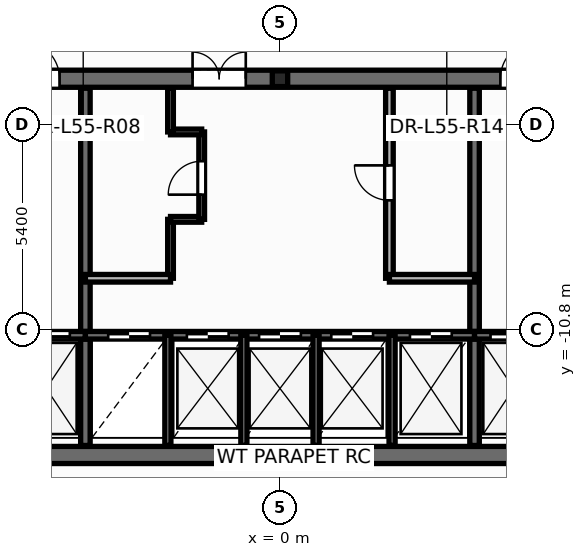
"""IFC4 building model, lengths in metres.
Left out: names, types, materials, properties, quantities, classifications, styles, units other than length and angle.
Written with IfcOpenShell. Run it as: python <this file> out.ifc"""

import sys

from ifc_helpers import new_model, si_unit, direction, frame, frame_2d, origin, origin_2d, place, context, subcontext, project, spatial, rectangle, i_section, extrude, element, fill, save


model = new_model("IFC4")
c1 = context("Model", 3, precision=1e-05, world=origin(), true_north=direction((0.0, 1.0)))
c2 = subcontext(c1, "Body", "Model", "MODEL_VIEW")
j1 = project(units=[si_unit("LENGTHUNIT", "METRE"), si_unit("PLANEANGLEUNIT", "RADIAN")], contexts=[c1])
p1 = place(None, origin())
s1 = spatial("IfcSite", under=j1, at=p1, CompositionType="ELEMENT")
p2 = place(p1, origin())
s2 = spatial("IfcBuilding", under=s1, at=p2, CompositionType="ELEMENT")
p3 = place(p2, frame((0.0, 0.0, 210.9)))
s3 = spatial("IfcBuildingStorey", under=s2, at=p3, CompositionType="ELEMENT", Elevation=210.9)
p4 = place(p3, frame((0.0, -4.2, 0.0), z_axis=(0.0, 0.0, 1.0), x_axis=(1.0, 0.0, 0.0)))
e1 = element("IfcColumn", 1, at=p4, inside=s3, PredefinedType="PILASTER", context=c2, shape_type="SweptSolid", body=[
    extrude(i_section(OverallWidth=0.405, OverallDepth=0.414, WebThickness=0.022, FlangeThickness=0.032, at=origin_2d()), origin(), (0.0, 0.0, 1.0), 3.6),
])
p5 = place(p3, frame((-2.88, -9.45, 0.0), z_axis=(0.0, 0.0, 1.0), x_axis=(0.0, 1.0, 0.0)))
e2 = element("IfcWall", 2, at=p5, inside=s3, PredefinedType="PARTITIONING", context=c2, shape_type="SweptSolid", body=[
    extrude(rectangle(XDim=1.55, YDim=0.15, at=frame_2d((0.775, 0.0))), origin(), (0.0, 0.0, 1.0), 3.345),
])
p6 = place(p3, frame((-2.88, -7.9, 0.0), z_axis=(0.0, 0.0, 1.0), x_axis=(1.0, 0.0, 0.0)))
e3 = element("IfcWall", 3, at=p6, inside=s3, PredefinedType="PARTITIONING", context=c2, shape_type="SweptSolid", body=[
    extrude(rectangle(XDim=0.82, YDim=0.15, at=frame_2d((0.41, 0.0))), origin(), (0.0, 0.0, 1.0), 3.345),
])
p7 = place(p3, frame((-2.06, -7.9, 0.0), z_axis=(0.0, 0.0, 1.0), x_axis=(0.0, 1.0, 0.0)))
e4 = element("IfcWall", 4, at=p7, inside=s3, PredefinedType="PARTITIONING", context=c2, shape_type="SweptSolid", body=[
    extrude(rectangle(XDim=2.3, YDim=0.15, at=frame_2d((1.15, 0.0))), origin(), (0.0, 0.0, 1.0), 3.345),
])
p8 = place(p7, frame((0.65, 0.0, 0.0)))
e5 = element("IfcOpeningElement", 5, at=p8, cuts=e4, PredefinedType="OPENING", context=c2, shape_type="SweptSolid", body=[
    extrude(rectangle(XDim=0.886, YDim=2.104, at=frame_2d((0.44, 1.052))), frame((0.0, 0.085, 0.0), z_axis=(0.0, -1.0, 0.0), x_axis=(1.0, 0.0, 0.0)), (0.0, 0.0, 1.0), 0.17),
])
p9 = place(p3, frame((-2.88, -5.6, 0.0), z_axis=(0.0, 0.0, 1.0), x_axis=(1.0, 0.0, 0.0)))
e6 = element("IfcWall", 6, at=p9, inside=s3, PredefinedType="PARTITIONING", context=c2, shape_type="SweptSolid", body=[
    extrude(rectangle(XDim=0.82, YDim=0.15, at=frame_2d((0.41, 0.0))), origin(), (0.0, 0.0, 1.0), 3.345),
])
p10 = place(p3, frame((-2.88, -5.6, 0.0), z_axis=(0.0, 0.0, 1.0), x_axis=(0.0, 1.0, 0.0)))
e7 = element("IfcWall", 7, at=p10, inside=s3, PredefinedType="PARTITIONING", context=c2, shape_type="SweptSolid", body=[
    extrude(rectangle(XDim=1.15, YDim=0.15, at=frame_2d((0.575, 0.0))), origin(), (0.0, 0.0, 1.0), 3.345),
])
p11 = place(p3, frame((-12.65, -14.1, 0.0), z_axis=(0.0, 0.0, 1.0), x_axis=(1.0, 0.0, 0.0)))
e8 = element("IfcWall", 8, at=p11, inside=s3, PredefinedType="SHEAR", context=c2, shape_type="SweptSolid", body=[
    extrude(rectangle(XDim=25.3, YDim=0.45, at=frame_2d((12.65, 0.0))), origin(), (0.0, 0.0, 1.0), 3.6),
])
p12 = place(p3, frame((-12.65, -4.2, 0.0), z_axis=(0.0, 0.0, 1.0), x_axis=(1.0, 0.0, 0.0)))
e9 = element("IfcWall", 9, at=p12, inside=s3, PredefinedType="SHEAR", context=c2, shape_type="SweptSolid", body=[
    extrude(rectangle(XDim=25.3, YDim=0.45, at=frame_2d((12.65, 0.0))), origin(), (0.0, 0.0, 1.0), 3.6),
])
p13 = place(p12, frame((1.85, 0.0, 0.0)))
e10 = element("IfcOpeningElement", 10, at=p13, cuts=e9, PredefinedType="OPENING", context=c2, shape_type="SweptSolid", body=[
    extrude(rectangle(XDim=0.756, YDim=2.054, at=frame_2d((0.375, 1.027))), frame((0.0, 0.235, 0.0), z_axis=(0.0, -1.0, 0.0), x_axis=(1.0, 0.0, 0.0)), (0.0, 0.0, 1.0), 0.47),
])
p14 = place(p12, frame((21.85, 0.0, 0.0)))
e11 = element("IfcOpeningElement", 11, at=p14, cuts=e9, PredefinedType="OPENING", context=c2, shape_type="SweptSolid", body=[
    extrude(rectangle(XDim=0.756, YDim=2.054, at=frame_2d((0.375, 1.027))), frame((0.0, 0.235, 0.0), z_axis=(0.0, -1.0, 0.0), x_axis=(1.0, 0.0, 0.0)), (0.0, 0.0, 1.0), 0.47),
])
p15 = place(p12, frame((23.5, 0.0, 0.0)))
e12 = element("IfcOpeningElement", 12, at=p15, cuts=e9, PredefinedType="OPENING", context=c2, shape_type="SweptSolid", body=[
    extrude(rectangle(XDim=0.756, YDim=2.054, at=frame_2d((0.375, 1.027))), frame((0.0, 0.235, 0.0), z_axis=(0.0, -1.0, 0.0), x_axis=(1.0, 0.0, 0.0)), (0.0, 0.0, 1.0), 0.47),
])
p16 = place(p12, frame((5.85, 0.0, 0.0)))
e13 = element("IfcOpeningElement", 13, at=p16, cuts=e9, PredefinedType="OPENING", context=c2, shape_type="SweptSolid", body=[
    extrude(rectangle(XDim=1.006, YDim=2.104, at=frame_2d((0.5, 1.052))), frame((0.0, 0.235, 0.0), z_axis=(0.0, -1.0, 0.0), x_axis=(1.0, 0.0, 0.0)), (0.0, 0.0, 1.0), 0.47),
])
p17 = place(p12, frame((10.35, 0.0, 0.0)))
e14 = element("IfcOpeningElement", 14, at=p17, cuts=e9, PredefinedType="OPENING", context=c2, shape_type="SweptSolid", body=[
    extrude(rectangle(XDim=1.406, YDim=2.154, at=frame_2d((0.7, 1.077))), frame((0.0, 0.235, 0.0), z_axis=(0.0, -1.0, 0.0), x_axis=(1.0, 0.0, 0.0)), (0.0, 0.0, 1.0), 0.47),
])
p18 = place(p12, frame((18.45, 0.0, 0.0)))
e15 = element("IfcOpeningElement", 15, at=p18, cuts=e9, PredefinedType="OPENING", context=c2, shape_type="SweptSolid", body=[
    extrude(rectangle(XDim=1.006, YDim=2.104, at=frame_2d((0.5, 1.052))), frame((0.0, 0.235, 0.0), z_axis=(0.0, -1.0, 0.0), x_axis=(1.0, 0.0, 0.0)), (0.0, 0.0, 1.0), 0.47),
])
for number, where, z_axis, x_axis in (
    (16, (-5.12, -13.85, 0.0), (0.0, 0.0, 1.0), (0.0, 1.0, 0.0)),
    (17, (5.12, -13.85, 0.0), (0.0, 0.0, 1.0), (0.0, 1.0, 0.0)),
):
    element("IfcWall", number, at=place(p3, frame(where, z_axis=z_axis, x_axis=x_axis)), inside=s3, PredefinedType="SHEAR", context=c2, shape_type="SweptSolid", body=[
        extrude(rectangle(XDim=9.4, YDim=0.25, at=frame_2d((4.7, 0.0))), origin(), (0.0, 0.0, 1.0), 3.6),
    ])
p19 = place(p3, frame((-8.48, -10.95, 0.0), z_axis=(0.0, 0.0, 1.0), x_axis=(1.0, 0.0, 0.0)))
e18 = element("IfcWall", 18, at=p19, inside=s3, PredefinedType="SOLIDWALL", context=c2, shape_type="SweptSolid", body=[
    extrude(rectangle(XDim=3.36, YDim=0.2, at=frame_2d((1.68, 0.0))), origin(), (0.0, 0.0, 1.0), 3.6),
])
p20 = place(p19, frame((0.28, 0.0, 0.0)))
e19 = element("IfcOpeningElement", 19, at=p20, cuts=e18, PredefinedType="OPENING", context=c2, shape_type="SweptSolid", body=[
    extrude(rectangle(XDim=0.756, YDim=2.054, at=frame_2d((0.375, 1.027))), frame((0.0, 0.11, 0.0), z_axis=(0.0, -1.0, 0.0), x_axis=(1.0, 0.0, 0.0)), (0.0, 0.0, 1.0), 0.22),
])
p21 = place(p19, frame((1.85, 0.0, 0.0)))
e20 = element("IfcOpeningElement", 20, at=p21, cuts=e18, PredefinedType="OPENING", context=c2, shape_type="SweptSolid", body=[
    extrude(rectangle(XDim=1.106, YDim=2.104, at=frame_2d((0.55, 1.052))), frame((0.0, 0.11, 0.0), z_axis=(0.0, -1.0, 0.0), x_axis=(1.0, 0.0, 0.0)), (0.0, 0.0, 1.0), 0.22),
])
p22 = place(p3, frame((-5.12, -10.95, 0.0), z_axis=(0.0, 0.0, 1.0), x_axis=(1.0, 0.0, 0.0)))
e21 = element("IfcWall", 21, at=p22, inside=s3, PredefinedType="SOLIDWALL", context=c2, shape_type="SweptSolid", body=[
    extrude(rectangle(XDim=10.24, YDim=0.2, at=frame_2d((5.12, 0.0))), origin(), (0.0, 0.0, 1.0), 3.6),
])
p23 = place(p22, frame((0.6, 0.0, 0.0)))
e22 = element("IfcOpeningElement", 22, at=p23, cuts=e21, PredefinedType="OPENING", context=c2, shape_type="SweptSolid", body=[
    extrude(rectangle(XDim=1.106, YDim=2.104, at=frame_2d((0.55, 1.052))), frame((0.0, 0.11, 0.0), z_axis=(0.0, -1.0, 0.0), x_axis=(1.0, 0.0, 0.0)), (0.0, 0.0, 1.0), 0.22),
])
p24 = place(p22, frame((2.67, 0.0, 0.0)))
e23 = element("IfcOpeningElement", 23, at=p24, cuts=e21, PredefinedType="OPENING", context=c2, shape_type="SweptSolid", body=[
    extrude(rectangle(XDim=1.106, YDim=2.104, at=frame_2d((0.55, 1.052))), frame((0.0, 0.11, 0.0), z_axis=(0.0, -1.0, 0.0), x_axis=(1.0, 0.0, 0.0)), (0.0, 0.0, 1.0), 0.22),
])
p25 = place(p22, frame((4.57, 0.0, 0.0)))
e24 = element("IfcOpeningElement", 24, at=p25, cuts=e21, PredefinedType="OPENING", context=c2, shape_type="SweptSolid", body=[
    extrude(rectangle(XDim=1.106, YDim=2.104, at=frame_2d((0.55, 1.052))), frame((0.0, 0.11, 0.0), z_axis=(0.0, -1.0, 0.0), x_axis=(1.0, 0.0, 0.0)), (0.0, 0.0, 1.0), 0.22),
])
p26 = place(p22, frame((6.47, 0.0, 0.0)))
e25 = element("IfcOpeningElement", 25, at=p26, cuts=e21, PredefinedType="OPENING", context=c2, shape_type="SweptSolid", body=[
    extrude(rectangle(XDim=1.106, YDim=2.104, at=frame_2d((0.55, 1.052))), frame((0.0, 0.11, 0.0), z_axis=(0.0, -1.0, 0.0), x_axis=(1.0, 0.0, 0.0)), (0.0, 0.0, 1.0), 0.22),
])
p27 = place(p22, frame((8.54, 0.0, 0.0)))
e26 = element("IfcOpeningElement", 26, at=p27, cuts=e21, PredefinedType="OPENING", context=c2, shape_type="SweptSolid", body=[
    extrude(rectangle(XDim=1.106, YDim=2.104, at=frame_2d((0.55, 1.052))), frame((0.0, 0.11, 0.0), z_axis=(0.0, -1.0, 0.0), x_axis=(1.0, 0.0, 0.0)), (0.0, 0.0, 1.0), 0.22),
])
p28 = place(p3, frame((5.12, -10.95, 0.0), z_axis=(0.0, 0.0, 1.0), x_axis=(1.0, 0.0, 0.0)))
e27 = element("IfcWall", 27, at=p28, inside=s3, PredefinedType="SOLIDWALL", context=c2, shape_type="SweptSolid", body=[
    extrude(rectangle(XDim=3.36, YDim=0.2, at=frame_2d((1.68, 0.0))), origin(), (0.0, 0.0, 1.0), 3.6),
])
p29 = place(p28, frame((0.42, 0.0, 0.0)))
e28 = element("IfcOpeningElement", 28, at=p29, cuts=e27, PredefinedType="OPENING", context=c2, shape_type="SweptSolid", body=[
    extrude(rectangle(XDim=1.106, YDim=2.104, at=frame_2d((0.55, 1.052))), frame((0.0, 0.11, 0.0), z_axis=(0.0, -1.0, 0.0), x_axis=(1.0, 0.0, 0.0)), (0.0, 0.0, 1.0), 0.22),
])
p30 = place(p28, frame((2.3, 0.0, 0.0)))
e29 = element("IfcOpeningElement", 29, at=p30, cuts=e27, PredefinedType="OPENING", context=c2, shape_type="SweptSolid", body=[
    extrude(rectangle(XDim=0.756, YDim=2.054, at=frame_2d((0.375, 1.027))), frame((0.0, 0.11, 0.0), z_axis=(0.0, -1.0, 0.0), x_axis=(1.0, 0.0, 0.0)), (0.0, 0.0, 1.0), 0.22),
])
for number, where, z_axis, x_axis in (
    (30, (-2.95, -13.85, 0.0), (0.0, 0.0, 1.0), (0.0, 1.0, 0.0)),
    (31, (2.95, -13.85, 0.0), (0.0, 0.0, 1.0), (0.0, 1.0, 0.0)),
):
    element("IfcWall", number, at=place(p3, frame(where, z_axis=z_axis, x_axis=x_axis)), inside=s3, PredefinedType="PARTITIONING", context=c2, shape_type="SweptSolid", body=[
        extrude(rectangle(XDim=2.9, YDim=0.16, at=frame_2d((1.45, 0.0))), origin(), (0.0, 0.0, 1.0), 2.47),
    ])
p31 = place(p3, frame((-5.12, -9.45, 0.0), z_axis=(0.0, 0.0, 1.0), x_axis=(1.0, 0.0, 0.0)))
e32 = element("IfcWall", 32, at=p31, inside=s3, PredefinedType="SOLIDWALL", context=c2, shape_type="SweptSolid", body=[
    extrude(rectangle(XDim=2.24, YDim=0.2, at=frame_2d((1.12, 0.0))), origin(), (0.0, 0.0, 1.0), 3.345),
])
p32 = place(p3, frame((2.88, -9.45, 0.0), z_axis=(0.0, 0.0, 1.0), x_axis=(0.0, 1.0, 0.0)))
e33 = element("IfcWall", 33, at=p32, inside=s3, PredefinedType="SOLIDWALL", context=c2, shape_type="SweptSolid", body=[
    extrude(rectangle(XDim=5.0, YDim=0.2, at=frame_2d((2.5, 0.0))), origin(), (0.0, 0.0, 1.0), 3.345),
])
p33 = place(p32, frame((2.05, 0.0, 0.0)))
e34 = element("IfcOpeningElement", 34, at=p33, cuts=e33, PredefinedType="OPENING", context=c2, shape_type="SweptSolid", body=[
    extrude(rectangle(XDim=0.926, YDim=2.104, at=frame_2d((0.46, 1.052))), frame((0.0, 0.11, 0.0), z_axis=(0.0, -1.0, 0.0), x_axis=(1.0, 0.0, 0.0)), (0.0, 0.0, 1.0), 0.22),
])
p34 = place(p3, frame((2.88, -9.45, 0.0), z_axis=(0.0, 0.0, 1.0), x_axis=(1.0, 0.0, 0.0)))
e35 = element("IfcWall", 35, at=p34, inside=s3, PredefinedType="SOLIDWALL", context=c2, shape_type="SweptSolid", body=[
    extrude(rectangle(XDim=2.24, YDim=0.2, at=frame_2d((1.12, 0.0))), origin(), (0.0, 0.0, 1.0), 3.345),
])
for number, where, z_axis, x_axis in (
    (36, (-0.95, -13.85, 0.0), (0.0, 0.0, 1.0), (0.0, 1.0, 0.0)),
    (37, (0.95, -13.85, 0.0), (0.0, 0.0, 1.0), (0.0, 1.0, 0.0)),
):
    element("IfcWall", number, at=place(p3, frame(where, z_axis=z_axis, x_axis=x_axis)), inside=s3, PredefinedType="PARTITIONING", context=c2, shape_type="SweptSolid", body=[
        extrude(rectangle(XDim=2.9, YDim=0.16, at=frame_2d((1.45, 0.0))), origin(), (0.0, 0.0, 1.0), 2.47),
    ])
p35 = place(p8, origin())
e38 = element("IfcDoor", 38, at=p35, inside=s3, OperationType="SINGLE_SWING_LEFT", PredefinedType="DOOR", context=c2, shape_type="SweptSolid", body=[
    extrude(rectangle(XDim=0.88, YDim=2.1, at=frame_2d((0.44, 1.05))), frame((0.0, 0.025, 0.0), z_axis=(0.0, -1.0, 0.0), x_axis=(1.0, 0.0, 0.0)), (0.0, 0.0, 1.0), 0.05),
])
fill(e5, e38)
p36 = place(p33, origin())
e39 = element("IfcDoor", 39, at=p36, inside=s3, OperationType="SINGLE_SWING_RIGHT", PredefinedType="DOOR", context=c2, shape_type="SweptSolid", body=[
    extrude(rectangle(XDim=0.92, YDim=2.1, at=frame_2d((0.46, 1.05))), frame((0.0, 0.025, 0.0), z_axis=(0.0, -1.0, 0.0), x_axis=(1.0, 0.0, 0.0)), (0.0, 0.0, 1.0), 0.05),
])
fill(e34, e39)
p37 = place(p21, origin())
e40 = element("IfcDoor", 40, at=p37, inside=s3, OperationType="DOUBLE_DOOR_SLIDING", PredefinedType="DOOR", context=c2, shape_type="SweptSolid", body=[
    extrude(rectangle(XDim=1.1, YDim=2.1, at=frame_2d((0.55, 1.05))), frame((0.0, 0.025, 0.0), z_axis=(0.0, -1.0, 0.0), x_axis=(1.0, 0.0, 0.0)), (0.0, 0.0, 1.0), 0.05),
])
fill(e20, e40)
p38 = place(p29, origin())
e41 = element("IfcDoor", 41, at=p38, inside=s3, OperationType="DOUBLE_DOOR_SLIDING", PredefinedType="DOOR", context=c2, shape_type="SweptSolid", body=[
    extrude(rectangle(XDim=1.1, YDim=2.1, at=frame_2d((0.55, 1.05))), frame((0.0, 0.025, 0.0), z_axis=(0.0, -1.0, 0.0), x_axis=(1.0, 0.0, 0.0)), (0.0, 0.0, 1.0), 0.05),
])
fill(e28, e41)
p39 = place(p23, origin())
e42 = element("IfcDoor", 42, at=p39, inside=s3, OperationType="DOUBLE_DOOR_SLIDING", PredefinedType="DOOR", context=c2, shape_type="SweptSolid", body=[
    extrude(rectangle(XDim=1.1, YDim=2.1, at=frame_2d((0.55, 1.05))), frame((0.0, 0.025, 0.0), z_axis=(0.0, -1.0, 0.0), x_axis=(1.0, 0.0, 0.0)), (0.0, 0.0, 1.0), 0.05),
])
fill(e22, e42)
p40 = place(p24, origin())
e43 = element("IfcDoor", 43, at=p40, inside=s3, OperationType="DOUBLE_DOOR_SLIDING", PredefinedType="DOOR", context=c2, shape_type="SweptSolid", body=[
    extrude(rectangle(XDim=1.1, YDim=2.1, at=frame_2d((0.55, 1.05))), frame((0.0, 0.025, 0.0), z_axis=(0.0, -1.0, 0.0), x_axis=(1.0, 0.0, 0.0)), (0.0, 0.0, 1.0), 0.05),
])
fill(e23, e43)
p41 = place(p25, origin())
e44 = element("IfcDoor", 44, at=p41, inside=s3, OperationType="DOUBLE_DOOR_SLIDING", PredefinedType="DOOR", context=c2, shape_type="SweptSolid", body=[
    extrude(rectangle(XDim=1.1, YDim=2.1, at=frame_2d((0.55, 1.05))), frame((0.0, 0.025, 0.0), z_axis=(0.0, -1.0, 0.0), x_axis=(1.0, 0.0, 0.0)), (0.0, 0.0, 1.0), 0.05),
])
fill(e24, e44)
p42 = place(p26, origin())
e45 = element("IfcDoor", 45, at=p42, inside=s3, OperationType="DOUBLE_DOOR_SLIDING", PredefinedType="DOOR", context=c2, shape_type="SweptSolid", body=[
    extrude(rectangle(XDim=1.1, YDim=2.1, at=frame_2d((0.55, 1.05))), frame((0.0, 0.025, 0.0), z_axis=(0.0, -1.0, 0.0), x_axis=(1.0, 0.0, 0.0)), (0.0, 0.0, 1.0), 0.05),
])
fill(e25, e45)
p43 = place(p27, origin())
e46 = element("IfcDoor", 46, at=p43, inside=s3, OperationType="DOUBLE_DOOR_SLIDING", PredefinedType="DOOR", context=c2, shape_type="SweptSolid", body=[
    extrude(rectangle(XDim=1.1, YDim=2.1, at=frame_2d((0.55, 1.05))), frame((0.0, 0.025, 0.0), z_axis=(0.0, -1.0, 0.0), x_axis=(1.0, 0.0, 0.0)), (0.0, 0.0, 1.0), 0.05),
])
fill(e26, e46)
p44 = place(p16, origin())
e47 = element("IfcDoor", 47, at=p44, inside=s3, OperationType="SINGLE_SWING_LEFT", PredefinedType="DOOR", context=c2, shape_type="SweptSolid", body=[
    extrude(rectangle(XDim=1.0, YDim=2.1, at=frame_2d((0.5, 1.05))), frame((0.0, 0.025, 0.0), z_axis=(0.0, -1.0, 0.0), x_axis=(1.0, 0.0, 0.0)), (0.0, 0.0, 1.0), 0.05),
])
fill(e13, e47)
p45 = place(p17, origin())
e48 = element("IfcDoor", 48, at=p45, inside=s3, OperationType="DOUBLE_DOOR_SINGLE_SWING", PredefinedType="DOOR", context=c2, shape_type="SweptSolid", body=[
    extrude(rectangle(XDim=1.4, YDim=2.15, at=frame_2d((0.7, 1.075))), frame((0.0, 0.025, 0.0), z_axis=(0.0, -1.0, 0.0), x_axis=(1.0, 0.0, 0.0)), (0.0, 0.0, 1.0), 0.05),
])
fill(e14, e48)
p46 = place(p18, origin())
e49 = element("IfcDoor", 49, at=p46, inside=s3, OperationType="SINGLE_SWING_RIGHT", PredefinedType="DOOR", context=c2, shape_type="SweptSolid", body=[
    extrude(rectangle(XDim=1.0, YDim=2.1, at=frame_2d((0.5, 1.05))), frame((0.0, 0.025, 0.0), z_axis=(0.0, -1.0, 0.0), x_axis=(1.0, 0.0, 0.0)), (0.0, 0.0, 1.0), 0.05),
])
fill(e15, e49)
save(model, sys.argv[1])
